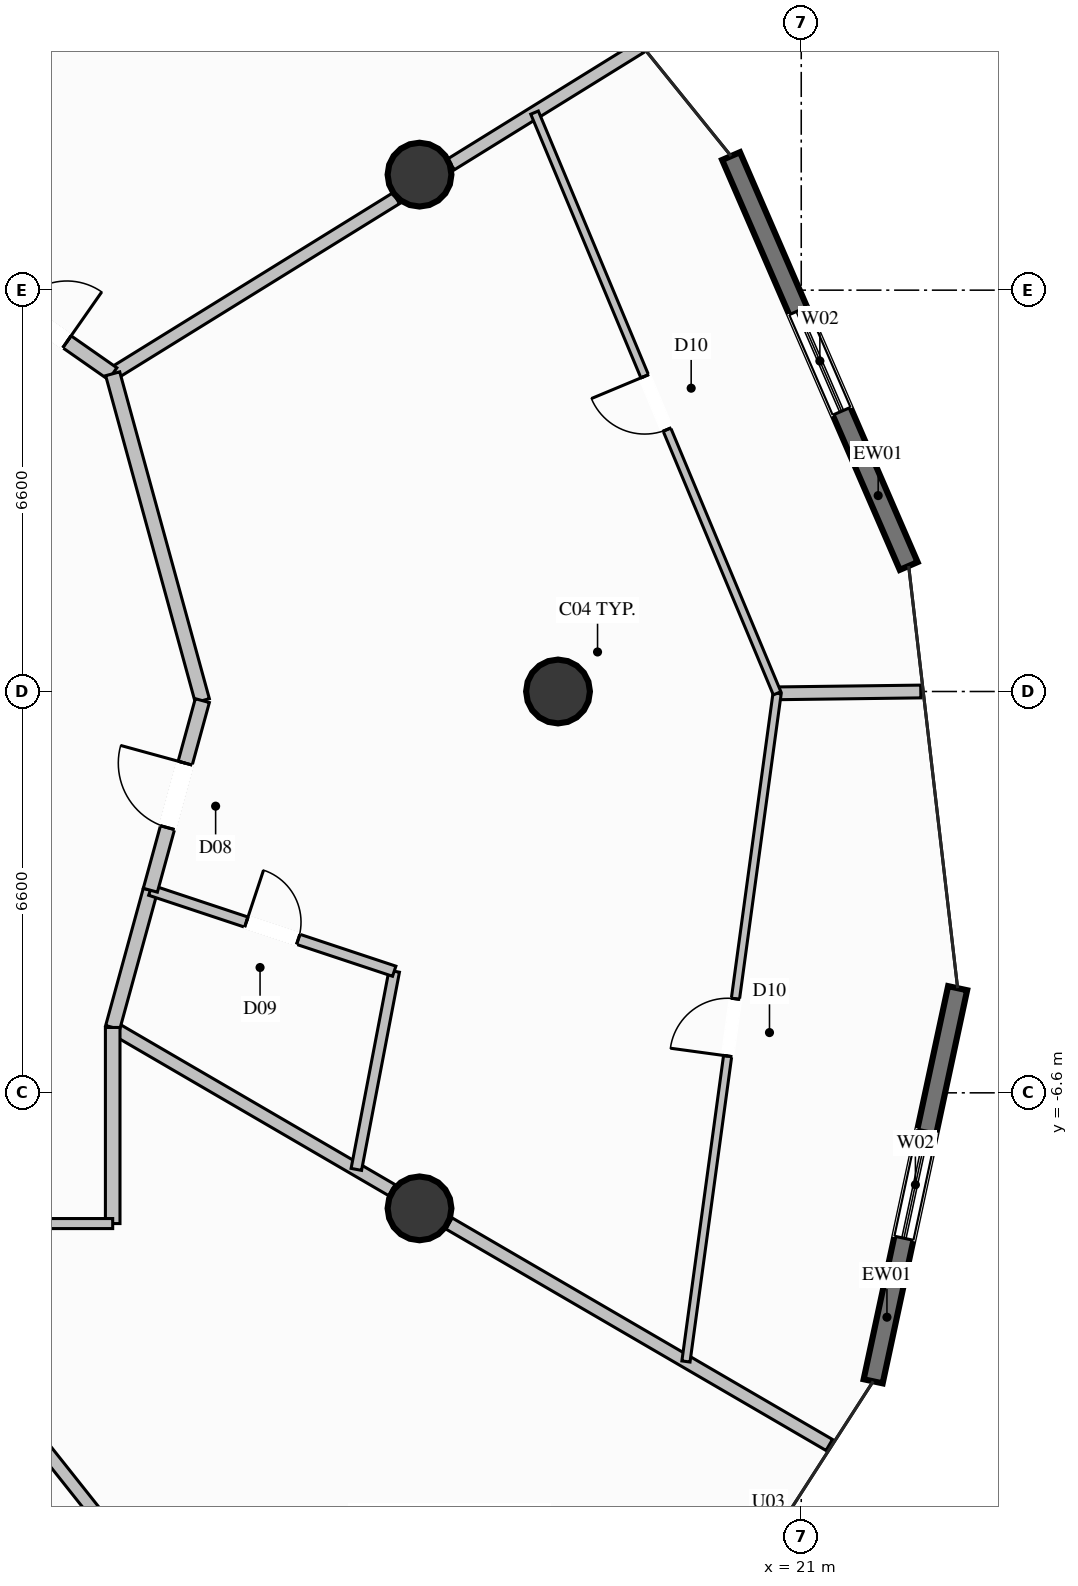
"""IFC4 building model, lengths in metres.
Left out: names, types, materials, properties, quantities, classifications, styles, units other than length and angle.
Written with IfcOpenShell. Run it as: python <this file> out.ifc"""

import sys

from ifc_helpers import new_model, si_unit, direction, frame, frame_2d, origin, origin_2d, place, context, subcontext, project, spatial, rectangle, circle, extrude, element, fill, save


model = new_model("IFC4")
c1 = context("Model", 3, precision=1e-05, world=origin(), true_north=direction((0.0, 1.0)))
c2 = subcontext(c1, "Body", "Model", "MODEL_VIEW")
j1 = project(units=[si_unit("LENGTHUNIT", "METRE"), si_unit("PLANEANGLEUNIT", "RADIAN")], contexts=[c1])
p1 = place(None, origin())
s1 = spatial("IfcSite", under=j1, at=p1, CompositionType="ELEMENT")
p2 = place(p1, origin())
s2 = spatial("IfcBuilding", under=s1, at=p2, CompositionType="ELEMENT")
p3 = place(p2, frame((0.0, 0.0, 142.2)))
s3 = spatial("IfcBuildingStorey", under=s2, at=p3, CompositionType="ELEMENT", Elevation=142.2)
for number, where, z_axis, x_axis in (
    (1, (17.0, 0.0, 0.0), (0.0, 0.0, 1.0), (1.0, 0.0, 0.0)),
    (2, (14.722, 8.5, 0.0), (0.0, 0.0, 1.0), (1.0, 0.0, 0.0)),
    (3, (14.722, -8.5, 0.0), (0.0, 0.0, 1.0), (1.0, 0.0, 0.0)),
):
    element("IfcColumn", number, at=place(p3, frame(where, z_axis=z_axis, x_axis=x_axis)), inside=s3, PredefinedType="COLUMN", context=c2, shape_type="SweptSolid", body=[
        extrude(circle(Radius=0.525, at=origin_2d()), origin(), (0.0, 0.0, 1.0), 3.6),
    ])
p4 = place(p3, frame((23.572, -4.879, 0.0), z_axis=(0.0, 0.0, 1.0), x_axis=(-0.210040904663, -0.977692599117, 0.0)))
e4 = element("IfcWall", 4, at=p4, inside=s3, PredefinedType="SOLIDWALL", context=c2, shape_type="SweptSolid", body=[
    extrude(rectangle(XDim=6.613, YDim=0.32, at=frame_2d((3.306, 0.0))), origin(), (0.0, 0.0, 1.0), 3.35),
])
p5 = place(p4, frame((2.406, 0.0, 0.35)))
e5 = element("IfcOpeningElement", 5, at=p5, cuts=e4, PredefinedType="OPENING", context=c2, shape_type="SweptSolid", body=[
    extrude(rectangle(XDim=1.8, YDim=2.6, at=frame_2d((0.9, 1.3))), frame((0.0, 0.17, 0.0), z_axis=(0.0, -1.0, 0.0), x_axis=(1.0, 0.0, 0.0)), (0.0, 0.0, 1.0), 0.34),
])
p6 = place(p3, frame((19.846, 8.805, 0.0), z_axis=(0.0, 0.0, 1.0), x_axis=(0.39761396578, -0.917552796419, 0.0)))
e6 = element("IfcWall", 6, at=p6, inside=s3, PredefinedType="SOLIDWALL", context=c2, shape_type="SweptSolid", body=[
    extrude(rectangle(XDim=7.347, YDim=0.32, at=frame_2d((3.673, 0.0))), origin(), (0.0, 0.0, 1.0), 3.35),
])
p7 = place(p6, frame((2.773, 0.0, 0.35)))
e7 = element("IfcOpeningElement", 7, at=p7, cuts=e6, PredefinedType="OPENING", context=c2, shape_type="SweptSolid", body=[
    extrude(rectangle(XDim=1.8, YDim=2.6, at=frame_2d((0.9, 1.3))), frame((0.0, 0.17, 0.0), z_axis=(0.0, -1.0, 0.0), x_axis=(1.0, 0.0, 0.0)), (0.0, 0.0, 1.0), 0.34),
])
p8 = place(p3, frame((9.676, 5.225, 0.0), z_axis=(0.0, 0.0, 1.0), x_axis=(0.850241428679, 0.526392926394, 0.0)))
e8 = element("IfcWall", 8, at=p8, inside=s3, PredefinedType="PARTITIONING", context=c2, shape_type="SweptSolid", body=[
    extrude(rectangle(XDim=5.484, YDim=0.21, at=frame_2d((2.742, 0.0))), origin(), (0.0, 0.0, 1.0), 2.718),
])
p9 = place(p3, frame((15.24, 8.669, 0.0), z_axis=(0.0, 0.0, 1.0), x_axis=(0.850222459569, 0.526423564484, 0.0)))
e9 = element("IfcWall", 9, at=p9, inside=s3, PredefinedType="PARTITIONING", context=c2, shape_type="SweptSolid", body=[
    extrude(rectangle(XDim=3.657, YDim=0.21, at=frame_2d((1.828, 0.0))), origin(), (0.0, 0.0, 1.0), 3.35),
])
p10 = place(p3, frame((9.676, -5.525, 0.0), z_axis=(0.0, 0.0, 1.0), x_axis=(0.864030429533, -0.503439586088, 0.0)))
e10 = element("IfcWall", 10, at=p10, inside=s3, PredefinedType="PARTITIONING", context=c2, shape_type="SweptSolid", body=[
    extrude(rectangle(XDim=5.313, YDim=0.21, at=frame_2d((2.657, 0.0))), origin(), (0.0, 0.0, 1.0), 2.718),
])
p11 = place(p3, frame((15.207, -8.748, 0.0), z_axis=(0.0, 0.0, 1.0), x_axis=(0.864082158656, -0.503350795263, 0.0)))
e11 = element("IfcWall", 11, at=p11, inside=s3, PredefinedType="PARTITIONING", context=c2, shape_type="SweptSolid", body=[
    extrude(rectangle(XDim=7.238, YDim=0.21, at=frame_2d((3.619, 0.0))), origin(), (0.0, 0.0, 1.0), 3.35),
])
p12 = place(p3, frame((7.35, 6.85, 0.0), z_axis=(0.0, 0.0, 1.0), x_axis=(0.819753050647, -0.57271715179, 0.0)))
e12 = element("IfcWall", 12, at=p12, inside=s3, PredefinedType="PARTITIONING", context=c2, shape_type="SweptSolid", body=[
    extrude(rectangle(XDim=2.837, YDim=0.24, at=frame_2d((1.419, 0.0))), origin(), (0.0, 0.0, 1.0), 3.35),
])
p13 = place(p12, frame((0.919, 0.0, 0.0)))
e13 = element("IfcOpeningElement", 13, at=p13, cuts=e12, PredefinedType="OPENING", context=c2, shape_type="SweptSolid", body=[
    extrude(rectangle(XDim=1.0, YDim=2.2, at=frame_2d((0.5, 1.1))), frame((0.0, 0.13, 0.0), z_axis=(0.0, -1.0, 0.0), x_axis=(1.0, 0.0, 0.0)), (0.0, 0.0, 1.0), 0.26),
])
p14 = place(p3, frame((9.676, -5.525, 0.0), z_axis=(0.0, 0.0, 1.0), x_axis=(0.264467775372, 0.964394522895, 0.0)))
e14 = element("IfcWall", 14, at=p14, inside=s3, PredefinedType="PARTITIONING", context=c2, shape_type="SweptSolid", body=[
    extrude(rectangle(XDim=2.34, YDim=0.24, at=frame_2d((1.17, 0.0))), origin(), (0.0, 0.0, 1.0), 3.35),
])
p15 = place(p3, frame((13.683, -7.859, 0.0), z_axis=(0.0, 0.0, 1.0), x_axis=(0.187717343652, 0.982223090185, 0.0)))
e15 = element("IfcWall", 15, at=p15, inside=s3, PredefinedType="PLUMBINGWALL", context=c2, shape_type="SweptSolid", body=[
    extrude(rectangle(XDim=3.318, YDim=0.175, at=frame_2d((1.659, 0.0))), origin(), (0.0, 0.0, 1.0), 3.35),
])
p16 = place(p3, frame((10.295, -3.268, 0.0), z_axis=(0.0, 0.0, 1.0), x_axis=(0.94903508074, -0.315170454715, 0.0)))
e16 = element("IfcWall", 16, at=p16, inside=s3, PredefinedType="PLUMBINGWALL", context=c2, shape_type="SweptSolid", body=[
    extrude(rectangle(XDim=4.226, YDim=0.175, at=frame_2d((2.113, 0.0))), origin(), (0.0, 0.0, 1.0), 3.35),
])
p17 = place(p16, frame((1.663, 0.0, 0.0)))
e17 = element("IfcOpeningElement", 17, at=p17, cuts=e16, PredefinedType="OPENING", context=c2, shape_type="SweptSolid", body=[
    extrude(rectangle(XDim=0.9, YDim=2.1, at=frame_2d((0.45, 1.05))), frame((0.0, 0.098, 0.0), z_axis=(0.0, -1.0, 0.0), x_axis=(1.0, 0.0, 0.0)), (0.0, 0.0, 1.0), 0.195),
])
p18 = place(p3, frame((20.603, -0.03, 0.0), z_axis=(0.0, 0.0, 1.0), x_axis=(0.999919264108, 0.012706898387, 0.0)))
e18 = element("IfcWall", 18, at=p18, inside=s3, PredefinedType="PARTITIONING", context=c2, shape_type="SweptSolid", body=[
    extrude(rectangle(XDim=2.363, YDim=0.21, at=frame_2d((1.182, 0.0))), origin(), (0.0, 0.0, 1.0), 3.35),
])
p19 = place(p3, frame((11.15, -0.15, 0.0), z_axis=(0.0, 0.0, 1.0), x_axis=(-0.264447801629, 0.964400000111, 0.0)))
e19 = element("IfcWall", 19, at=p19, inside=s3, PredefinedType="PARTITIONING", context=c2, shape_type="SweptSolid", body=[
    extrude(rectangle(XDim=5.573, YDim=0.24, at=frame_2d((2.787, 0.0))), origin(), (0.0, 0.0, 1.0), 3.35),
])
p20 = place(p3, frame((10.295, -3.268, 0.0), z_axis=(0.0, 0.0, 1.0), x_axis=(0.264433345006, 0.96440396414, 0.0)))
e20 = element("IfcWall", 20, at=p20, inside=s3, PredefinedType="PARTITIONING", context=c2, shape_type="SweptSolid", body=[
    extrude(rectangle(XDim=3.233, YDim=0.24, at=frame_2d((1.617, 0.0))), origin(), (0.0, 0.0, 1.0), 3.35),
])
p21 = place(p20, frame((1.067, 0.0, 0.0)))
e21 = element("IfcOpeningElement", 21, at=p21, cuts=e20, PredefinedType="OPENING", context=c2, shape_type="SweptSolid", body=[
    extrude(rectangle(XDim=1.1, YDim=2.3, at=frame_2d((0.55, 1.15))), frame((0.0, 0.13, 0.0), z_axis=(0.0, -1.0, 0.0), x_axis=(1.0, 0.0, 0.0)), (0.0, 0.0, 1.0), 0.26),
])
p22 = place(p3, frame((19.104, -11.018, 0.0), z_axis=(0.0, 0.0, 1.0), x_axis=(0.135171166516, 0.990822262438, 0.0)))
e22 = element("IfcWall", 22, at=p22, inside=s3, PredefinedType="PARTITIONING", context=c2, shape_type="SweptSolid", body=[
    extrude(rectangle(XDim=11.09, YDim=0.135, at=frame_2d((5.545, 0.0))), origin(), (0.0, 0.0, 1.0), 3.35),
])
p23 = place(p22, frame((5.07, 0.0, 0.0)))
e23 = element("IfcOpeningElement", 23, at=p23, cuts=e22, PredefinedType="OPENING", context=c2, shape_type="SweptSolid", body=[
    extrude(rectangle(XDim=0.95, YDim=2.1, at=frame_2d((0.475, 1.05))), frame((0.0, 0.078, 0.0), z_axis=(0.0, -1.0, 0.0), x_axis=(1.0, 0.0, 0.0)), (0.0, 0.0, 1.0), 0.155),
])
p24 = place(p3, frame((20.603, -0.03, 0.0), z_axis=(0.0, 0.0, 1.0), x_axis=(-0.385424249403, 0.922739480012, 0.0)))
e24 = element("IfcWall", 24, at=p24, inside=s3, PredefinedType="PARTITIONING", context=c2, shape_type="SweptSolid", body=[
    extrude(rectangle(XDim=10.35, YDim=0.135, at=frame_2d((5.175, 0.0))), origin(), (0.0, 0.0, 1.0), 3.35),
])
p25 = place(p24, frame((4.7, 0.0, 0.0)))
e25 = element("IfcOpeningElement", 25, at=p25, cuts=e24, PredefinedType="OPENING", context=c2, shape_type="SweptSolid", body=[
    extrude(rectangle(XDim=0.95, YDim=2.1, at=frame_2d((0.475, 1.05))), frame((0.0, 0.078, 0.0), z_axis=(0.0, -1.0, 0.0), x_axis=(1.0, 0.0, 0.0)), (0.0, 0.0, 1.0), 0.155),
])
p26 = place(p3, frame((5.612, -8.75, 0.0), z_axis=(0.0, 0.0, 1.0), x_axis=(0.621887455735, -0.78310662901, 0.0)))
e26 = element("IfcWall", 26, at=p26, inside=s3, PredefinedType="PARTITIONING", context=c2, shape_type="SweptSolid", body=[
    extrude(rectangle(XDim=14.093, YDim=0.21, at=frame_2d((7.046, 0.0))), origin(), (0.0, 0.0, 1.0), 3.35),
])
p27 = place(p3, frame((9.676, -8.75, 0.0), z_axis=(0.0, 0.0, 1.0), x_axis=(0.0, 1.0, 0.0)))
e27 = element("IfcWall", 27, at=p27, inside=s3, PredefinedType="PARTITIONING", context=c2, shape_type="SweptSolid", body=[
    extrude(rectangle(XDim=3.225, YDim=0.24, at=frame_2d((1.613, 0.0))), origin(), (0.0, 0.0, 1.0), 3.35),
])
p28 = place(p3, frame((5.612, -8.75, 0.0), z_axis=(0.0, 0.0, 1.0), x_axis=(1.0, 0.0, 0.0)))
e28 = element("IfcWall", 28, at=p28, inside=s3, PredefinedType="PARTITIONING", context=c2, shape_type="SweptSolid", body=[
    extrude(rectangle(XDim=4.064, YDim=0.165, at=frame_2d((2.032, 0.0))), origin(), (0.0, 0.0, 1.0), 3.35),
])
p29 = place(p28, frame((1.557, 0.0, 0.0)))
e29 = element("IfcOpeningElement", 29, at=p29, cuts=e28, PredefinedType="OPENING", context=c2, shape_type="SweptSolid", body=[
    extrude(rectangle(XDim=0.95, YDim=2.1, at=frame_2d((0.475, 1.05))), frame((0.0, 0.093, 0.0), z_axis=(0.0, -1.0, 0.0), x_axis=(1.0, 0.0, 0.0)), (0.0, 0.0, 1.0), 0.185),
])
p30 = place(p5, origin())
e30 = element("IfcWindow", 30, at=p30, inside=s3, PartitioningType="SINGLE_PANEL", PredefinedType="WINDOW", context=c2, shape_type="SweptSolid", body=[
    extrude(rectangle(XDim=1.8, YDim=2.6, at=frame_2d((0.9, 1.3))), frame((0.0, 0.03, 0.0), z_axis=(0.0, -1.0, 0.0), x_axis=(1.0, 0.0, 0.0)), (0.0, 0.0, 1.0), 0.06),
])
fill(e5, e30)
p31 = place(p7, origin())
e31 = element("IfcWindow", 31, at=p31, inside=s3, PartitioningType="SINGLE_PANEL", PredefinedType="WINDOW", context=c2, shape_type="SweptSolid", body=[
    extrude(rectangle(XDim=1.8, YDim=2.6, at=frame_2d((0.9, 1.3))), frame((0.0, 0.03, 0.0), z_axis=(0.0, -1.0, 0.0), x_axis=(1.0, 0.0, 0.0)), (0.0, 0.0, 1.0), 0.06),
])
fill(e7, e31)
p32 = place(p13, origin())
e32 = element("IfcDoor", 32, at=p32, inside=s3, OperationType="SINGLE_SWING_RIGHT", PredefinedType="DOOR", context=c2, shape_type="SweptSolid", body=[
    extrude(rectangle(XDim=1.0, YDim=2.2, at=frame_2d((0.5, 1.1))), frame((0.0, 0.025, 0.0), z_axis=(0.0, -1.0, 0.0), x_axis=(1.0, 0.0, 0.0)), (0.0, 0.0, 1.0), 0.05),
])
fill(e13, e32)
p33 = place(p17, origin())
e33 = element("IfcDoor", 33, at=p33, inside=s3, OperationType="SINGLE_SWING_LEFT", PredefinedType="DOOR", context=c2, shape_type="SweptSolid", body=[
    extrude(rectangle(XDim=0.9, YDim=2.1, at=frame_2d((0.45, 1.05))), frame((0.0, 0.025, 0.0), z_axis=(0.0, -1.0, 0.0), x_axis=(1.0, 0.0, 0.0)), (0.0, 0.0, 1.0), 0.05),
])
fill(e17, e33)
p34 = place(p21, origin())
e34 = element("IfcDoor", 34, at=p34, inside=s3, OperationType="SINGLE_SWING_RIGHT", PredefinedType="DOOR", context=c2, shape_type="SweptSolid", body=[
    extrude(rectangle(XDim=1.1, YDim=2.3, at=frame_2d((0.55, 1.15))), frame((0.0, 0.025, 0.0), z_axis=(0.0, -1.0, 0.0), x_axis=(1.0, 0.0, 0.0)), (0.0, 0.0, 1.0), 0.05),
])
fill(e21, e34)
p35 = place(p23, origin())
e35 = element("IfcDoor", 35, at=p35, inside=s3, OperationType="SINGLE_SWING_LEFT", PredefinedType="DOOR", context=c2, shape_type="SweptSolid", body=[
    extrude(rectangle(XDim=0.95, YDim=2.1, at=frame_2d((0.475, 1.05))), frame((0.0, 0.025, 0.0), z_axis=(0.0, -1.0, 0.0), x_axis=(1.0, 0.0, 0.0)), (0.0, 0.0, 1.0), 0.05),
])
fill(e23, e35)
p36 = place(p25, origin())
e36 = element("IfcDoor", 36, at=p36, inside=s3, OperationType="SINGLE_SWING_RIGHT", PredefinedType="DOOR", context=c2, shape_type="SweptSolid", body=[
    extrude(rectangle(XDim=0.95, YDim=2.1, at=frame_2d((0.475, 1.05))), frame((0.0, 0.025, 0.0), z_axis=(0.0, -1.0, 0.0), x_axis=(1.0, 0.0, 0.0)), (0.0, 0.0, 1.0), 0.05),
])
fill(e25, e36)
save(model, sys.argv[1])
